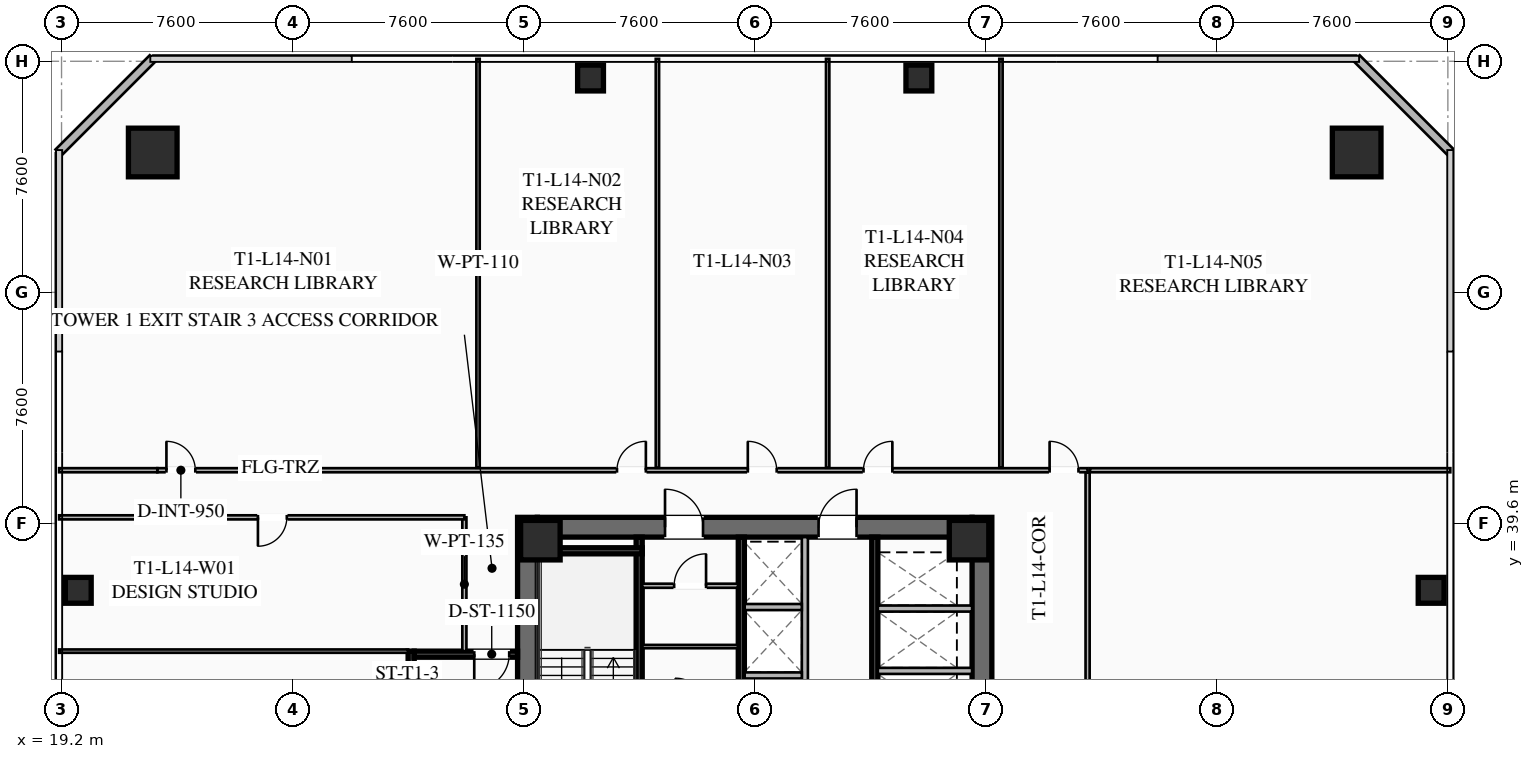
"""IFC4 building model, lengths in metres.
Left out: names, types, materials, properties, quantities, classifications, styles, units other than length and angle.
Written with IfcOpenShell. Run it as: python <this file> out.ifc"""

import sys

from ifc_helpers import new_model, si_unit, direction, frame, frame_2d, origin, origin_2d, place, context, subcontext, project, spatial, rectangle, hollow_rectangle, extrude, element, fill, save


model = new_model("IFC4")
c1 = context("Model", 3, precision=1e-05, world=origin(), true_north=direction((0.0, 1.0)))
c2 = subcontext(c1, "Body", "Model", "MODEL_VIEW")
j1 = project(units=[si_unit("LENGTHUNIT", "METRE"), si_unit("PLANEANGLEUNIT", "RADIAN")], contexts=[c1])
p1 = place(None, origin())
s1 = spatial("IfcSite", under=j1, at=p1, CompositionType="ELEMENT")
p2 = place(p1, origin())
s2 = spatial("IfcBuilding", under=s1, at=p2, CompositionType="ELEMENT")
p3 = place(p2, frame((0.0, 0.0, 56.55)))
s3 = spatial("IfcBuildingStorey", under=s2, at=p3, CompositionType="ELEMENT", Elevation=56.55)
for number, where, z_axis, x_axis in (
    (1, (34.525, 24.2, 0.0), (0.0, 0.0, 1.0), (0.0, 1.0, 0.0)),
    (2, (49.475, 39.8, 0.0), (0.0, 0.0, 1.0), (0.0, -1.0, 0.0)),
):
    element("IfcWall", number, at=place(p3, frame(where, z_axis=z_axis, x_axis=x_axis)), inside=s3, PredefinedType="SHEAR", context=c2, shape_type="SweptSolid", body=[
        extrude(rectangle(XDim=15.6, YDim=0.65, at=frame_2d((7.8, 0.0))), origin(), (0.0, 0.0, 1.0), 3.55),
    ])
p4 = place(p3, frame((34.85, 39.475, 0.0), z_axis=(0.0, 0.0, 1.0), x_axis=(1.0, 0.0, 0.0)))
e3 = element("IfcWall", 3, at=p4, inside=s3, PredefinedType="SHEAR", context=c2, shape_type="SweptSolid", body=[
    extrude(rectangle(XDim=14.3, YDim=0.65, at=frame_2d((7.15, 0.0))), origin(), (0.0, 0.0, 1.0), 3.55),
])
p5 = place(p4, frame((4.2, 0.0, 0.0)))
e4 = element("IfcOpeningElement", 4, at=p5, cuts=e3, PredefinedType="OPENING", context=c2, shape_type="SweptSolid", body=[
    extrude(rectangle(XDim=1.25, YDim=2.25, at=frame_2d((0.625, 1.125))), frame((0.0, 0.335, 0.0), z_axis=(0.0, -1.0, 0.0), x_axis=(1.0, 0.0, 0.0)), (0.0, 0.0, 1.0), 0.67),
])
p6 = place(p4, frame((9.25, 0.0, 0.0)))
e5 = element("IfcOpeningElement", 5, at=p6, cuts=e3, PredefinedType="OPENING", context=c2, shape_type="SweptSolid", body=[
    extrude(rectangle(XDim=1.25, YDim=2.25, at=frame_2d((0.625, 1.125))), frame((0.0, 0.335, 0.0), z_axis=(0.0, -1.0, 0.0), x_axis=(1.0, 0.0, 0.0)), (0.0, 0.0, 1.0), 0.67),
])
for number, where, z_axis, x_axis in (
    (6, (49.05, 39.05, 0.0), (0.0, 0.0, 1.0), (1.0, 0.0, 0.0)),
    (7, (34.95, 39.05, 0.0), (0.0, 0.0, 1.0), (1.0, 0.0, 0.0)),
):
    element("IfcColumn", number, at=place(p3, frame(where, z_axis=z_axis, x_axis=x_axis)), inside=s3, PredefinedType="COLUMN", context=c2, shape_type="SweptSolid", body=[
        extrude(hollow_rectangle(XDim=1.3, YDim=1.3, WallThickness=0.05, at=origin_2d()), origin(), (0.0, 0.0, 1.0), 3.35),
    ])
for number, where, z_axis, x_axis in (
    (8, (61.8, 51.8, 0.0), (0.0, 0.0, 1.0), (1.0, 0.0, 0.0)),
    (9, (22.2, 51.8, 0.0), (0.0, 0.0, 1.0), (1.0, 0.0, 0.0)),
):
    element("IfcColumn", number, at=place(p3, frame(where, z_axis=z_axis, x_axis=x_axis)), inside=s3, PredefinedType="COLUMN", context=c2, shape_type="SweptSolid", body=[
        extrude(hollow_rectangle(XDim=1.6, YDim=1.6, WallThickness=0.06, at=origin_2d()), origin(), (0.0, 0.0, 1.0), 3.35),
    ])
for number, where, z_axis, x_axis in (
    (10, (64.25, 37.4, 0.0), (0.0, 0.0, 1.0), (1.0, 0.0, 0.0)),
    (11, (47.4, 54.25, 0.0), (0.0, 0.0, 1.0), (1.0, 0.0, 0.0)),
    (12, (36.6, 54.25, 0.0), (0.0, 0.0, 1.0), (1.0, 0.0, 0.0)),
    (13, (19.75, 37.4, 0.0), (0.0, 0.0, 1.0), (1.0, 0.0, 0.0)),
):
    element("IfcColumn", number, at=place(p3, frame(where, z_axis=z_axis, x_axis=x_axis)), inside=s3, PredefinedType="COLUMN", context=c2, shape_type="SweptSolid", body=[
        extrude(hollow_rectangle(XDim=0.85, YDim=0.85, WallThickness=0.035, at=origin_2d()), origin(), (0.0, 0.0, 1.0), 3.35),
    ])
for number, where, z_axis, x_axis in (
    (14, (19.1, 51.8, 0.0), (0.0, 0.0, 1.0), (0.707, 0.707, 0.0)),
    (15, (61.8, 54.9, 0.0), (0.0, 0.0, 1.0), (0.707, -0.707, 0.0)),
):
    element("IfcWall", number, at=place(p3, frame(where, z_axis=z_axis, x_axis=x_axis)), inside=s3, PredefinedType="SOLIDWALL", context=c2, shape_type="SweptSolid", body=[
        extrude(rectangle(XDim=4.384, YDim=0.28, at=frame_2d((2.192, 0.0))), origin(), (0.0, 0.0, 1.0), 3.35),
    ])
p7 = place(p3, frame((38.2, 31.2, 0.0), z_axis=(0.0, 0.0, 1.0), x_axis=(0.0, 1.0, 0.0)))
e16 = element("IfcWall", 16, at=p7, inside=s3, PredefinedType="SHEAR", context=c2, shape_type="SweptSolid", body=[
    extrude(rectangle(XDim=7.95, YDim=0.2, at=frame_2d((3.975, 0.0))), origin(), (0.0, 0.0, 1.0), 3.35),
])
p8 = place(p7, frame((0.45, 0.0, 0.0)))
e17 = element("IfcOpeningElement", 17, at=p8, cuts=e16, PredefinedType="OPENING", context=c2, shape_type="SweptSolid", body=[
    extrude(rectangle(XDim=1.15, YDim=2.2, at=frame_2d((0.575, 1.1))), frame((0.0, 0.11, 0.0), z_axis=(0.0, -1.0, 0.0), x_axis=(1.0, 0.0, 0.0)), (0.0, 0.0, 1.0), 0.22),
])
p9 = place(p3, frame((34.85, 38.7, 0.0), z_axis=(0.0, 0.0, 1.0), x_axis=(1.0, 0.0, 0.0)))
e18 = element("IfcWall", 18, at=p9, inside=s3, PredefinedType="SHEAR", context=c2, shape_type="SweptSolid", body=[
    extrude(rectangle(XDim=3.45, YDim=0.2, at=frame_2d((1.725, 0.0))), origin(), (0.0, 0.0, 1.0), 3.35),
])
p10 = place(p3, frame((41.56, 24.85, 0.0), z_axis=(0.0, 0.0, 1.0), x_axis=(0.0, 1.0, 0.0)))
e19 = element("IfcWall", 19, at=p10, inside=s3, PredefinedType="SHEAR", context=c2, shape_type="SweptSolid", body=[
    extrude(rectangle(XDim=14.3, YDim=0.2, at=frame_2d((7.15, 0.0))), origin(), (0.0, 0.0, 1.0), 3.35),
])
p11 = place(p3, frame((45.95, 39.15, 0.0), z_axis=(0.0, 0.0, 1.0), x_axis=(0.0, -1.0, 0.0)))
e20 = element("IfcWall", 20, at=p11, inside=s3, PredefinedType="SHEAR", context=c2, shape_type="SweptSolid", body=[
    extrude(rectangle(XDim=6.35, YDim=0.2, at=frame_2d((3.175, 0.0))), origin(), (0.0, 0.0, 1.0), 3.35),
])
for number, where, z_axis, x_axis in (
    (21, (46.05, 34.75, 0.0), (0.0, 0.0, 1.0), (1.0, 0.0, 0.0)),
    (22, (46.05, 36.8, 0.0), (0.0, 0.0, 1.0), (1.0, 0.0, 0.0)),
):
    element("IfcWall", number, at=place(p3, frame(where, z_axis=z_axis, x_axis=x_axis)), inside=s3, PredefinedType="SOLIDWALL", context=c2, shape_type="SweptSolid", body=[
        extrude(rectangle(XDim=3.1, YDim=0.2, at=frame_2d((1.55, 0.0))), origin(), (0.0, 0.0, 1.0), 3.35),
    ])
p12 = place(p3, frame((38.3, 37.55, 0.0), z_axis=(0.0, 0.0, 1.0), x_axis=(1.0, 0.0, 0.0)))
e23 = element("IfcWall", 23, at=p12, inside=s3, PredefinedType="PARTITIONING", context=c2, shape_type="SweptSolid", body=[
    extrude(rectangle(XDim=3.15, YDim=0.135, at=frame_2d((1.575, 0.0))), origin(), (0.0, 0.0, 1.0), 2.703),
])
p13 = place(p12, frame((1.05, 0.0, 0.0)))
e24 = element("IfcOpeningElement", 24, at=p13, cuts=e23, PredefinedType="OPENING", context=c2, shape_type="SweptSolid", body=[
    extrude(rectangle(XDim=1.05, YDim=2.2, at=frame_2d((0.525, 1.1))), frame((0.0, 0.077, 0.0), z_axis=(0.0, -1.0, 0.0), x_axis=(1.0, 0.0, 0.0)), (0.0, 0.0, 1.0), 0.155),
])
p14 = place(p3, frame((38.3, 35.55, 0.0), z_axis=(0.0, 0.0, 1.0), x_axis=(1.0, 0.0, 0.0)))
e25 = element("IfcWall", 25, at=p14, inside=s3, PredefinedType="PARTITIONING", context=c2, shape_type="SweptSolid", body=[
    extrude(rectangle(XDim=3.15, YDim=0.11, at=frame_2d((1.575, 0.0))), origin(), (0.0, 0.0, 1.0), 2.703),
])
p15 = place(p3, frame((43.65, 32.35, 0.0), z_axis=(0.0, 0.0, 1.0), x_axis=(0.0, 1.0, 0.0)))
e26 = element("IfcWall", 26, at=p15, inside=s3, PredefinedType="SOLIDWALL", context=c2, shape_type="SweptSolid", body=[
    extrude(rectangle(XDim=6.8, YDim=0.2, at=frame_2d((3.4, 0.0))), origin(), (0.0, 0.0, 1.0), 3.35),
])
for number, where, z_axis, x_axis in (
    (27, (41.67, 34.6, 0.0), (0.0, 0.0, 1.0), (1.0, 0.0, 0.0)),
    (28, (41.67, 36.85, 0.0), (0.0, 0.0, 1.0), (1.0, 0.0, 0.0)),
):
    element("IfcWall", number, at=place(p3, frame(where, z_axis=z_axis, x_axis=x_axis)), inside=s3, PredefinedType="SOLIDWALL", context=c2, shape_type="SweptSolid", body=[
        extrude(rectangle(XDim=1.88, YDim=0.2, at=frame_2d((0.94, 0.0))), origin(), (0.0, 0.0, 1.0), 3.35),
    ])
p16 = place(p3, frame((30.7, 28.6, 0.0), z_axis=(0.0, 0.0, 1.0), x_axis=(0.0, 1.0, 0.0)))
e29 = element("IfcWall", 29, at=p16, inside=s3, PredefinedType="SHEAR", context=c2, shape_type="SweptSolid", body=[
    extrude(rectangle(XDim=6.8, YDim=0.2, at=frame_2d((3.4, 0.0))), origin(), (0.0, 0.0, 1.0), 3.35),
])
p17 = place(p3, frame((34.2, 35.3, 0.0), z_axis=(0.0, 0.0, 1.0), x_axis=(-1.0, 0.0, 0.0)))
e30 = element("IfcWall", 30, at=p17, inside=s3, PredefinedType="SHEAR", context=c2, shape_type="SweptSolid", body=[
    extrude(rectangle(XDim=3.4, YDim=0.2, at=frame_2d((1.7, 0.0))), origin(), (0.0, 0.0, 1.0), 3.35),
])
p18 = place(p17, frame((0.275, 0.0, 0.0)))
e31 = element("IfcOpeningElement", 31, at=p18, cuts=e30, PredefinedType="OPENING", context=c2, shape_type="SweptSolid", body=[
    extrude(rectangle(XDim=1.15, YDim=2.2, at=frame_2d((0.575, 1.1))), frame((0.0, 0.11, 0.0), z_axis=(0.0, -1.0, 0.0), x_axis=(1.0, 0.0, 0.0)), (0.0, 0.0, 1.0), 0.22),
])
p19 = place(p3, frame((32.45, 35.4, 0.0), z_axis=(0.0, 0.0, 1.0), x_axis=(0.0, 1.0, 0.0)))
e32 = element("IfcWall", 32, at=p19, inside=s3, PredefinedType="PARTITIONING", context=c2, shape_type="SweptSolid", body=[
    extrude(rectangle(XDim=4.4, YDim=0.135, at=frame_2d((2.2, 0.0))), origin(), (0.0, 0.0, 1.0), 2.703),
])
p20 = place(p3, frame((22.35, 41.35, 0.0), z_axis=(0.0, 0.0, 1.0), x_axis=(1.0, 0.0, 0.0)))
e33 = element("IfcWall", 33, at=p20, inside=s3, PredefinedType="PARTITIONING", context=c2, shape_type="SweptSolid", body=[
    extrude(rectangle(XDim=30.6, YDim=0.135, at=frame_2d((15.3, 0.0))), origin(), (0.0, 0.0, 1.0), 2.703),
])
p21 = place(p20, frame((0.3, 0.0, 0.0)))
e34 = element("IfcOpeningElement", 34, at=p21, cuts=e33, PredefinedType="OPENING", context=c2, shape_type="SweptSolid", body=[
    extrude(rectangle(XDim=0.95, YDim=2.05, at=frame_2d((0.475, 1.025))), frame((0.0, 0.077, 0.0), z_axis=(0.0, -1.0, 0.0), x_axis=(1.0, 0.0, 0.0)), (0.0, 0.0, 1.0), 0.155),
])
p22 = place(p20, frame((15.12, 0.0, 0.0)))
e35 = element("IfcOpeningElement", 35, at=p22, cuts=e33, PredefinedType="OPENING", context=c2, shape_type="SweptSolid", body=[
    extrude(rectangle(XDim=0.95, YDim=2.05, at=frame_2d((0.475, 1.025))), frame((0.0, 0.077, 0.0), z_axis=(0.0, -1.0, 0.0), x_axis=(1.0, 0.0, 0.0)), (0.0, 0.0, 1.0), 0.155),
])
p23 = place(p20, frame((19.423, 0.0, 0.0)))
e36 = element("IfcOpeningElement", 36, at=p23, cuts=e33, PredefinedType="OPENING", context=c2, shape_type="SweptSolid", body=[
    extrude(rectangle(XDim=0.95, YDim=2.05, at=frame_2d((0.475, 1.025))), frame((0.0, 0.077, 0.0), z_axis=(0.0, -1.0, 0.0), x_axis=(1.0, 0.0, 0.0)), (0.0, 0.0, 1.0), 0.155),
])
p24 = place(p20, frame((23.228, 0.0, 0.0)))
e37 = element("IfcOpeningElement", 37, at=p24, cuts=e33, PredefinedType="OPENING", context=c2, shape_type="SweptSolid", body=[
    extrude(rectangle(XDim=0.95, YDim=2.05, at=frame_2d((0.475, 1.025))), frame((0.0, 0.077, 0.0), z_axis=(0.0, -1.0, 0.0), x_axis=(1.0, 0.0, 0.0)), (0.0, 0.0, 1.0), 0.155),
])
p25 = place(p20, frame((29.35, 0.0, 0.0)))
e38 = element("IfcOpeningElement", 38, at=p25, cuts=e33, PredefinedType="OPENING", context=c2, shape_type="SweptSolid", body=[
    extrude(rectangle(XDim=0.95, YDim=2.05, at=frame_2d((0.475, 1.025))), frame((0.0, 0.077, 0.0), z_axis=(0.0, -1.0, 0.0), x_axis=(1.0, 0.0, 0.0)), (0.0, 0.0, 1.0), 0.155),
])
p26 = place(p3, frame((19.12, 41.35, 0.0), z_axis=(0.0, 0.0, 1.0), x_axis=(1.0, 0.0, 0.0)))
e39 = element("IfcWall", 39, at=p26, inside=s3, PredefinedType="PARTITIONING", context=c2, shape_type="SweptSolid", body=[
    extrude(rectangle(XDim=3.23, YDim=0.135, at=frame_2d((1.615, 0.0))), origin(), (0.0, 0.0, 1.0), 2.703),
])
for number, where, z_axis, x_axis in (
    (40, (32.9, 41.43, 0.0), (0.0, 0.0, 1.0), (0.0, 1.0, 0.0)),
    (41, (38.8, 41.43, 0.0), (0.0, 0.0, 1.0), (0.0, 1.0, 0.0)),
    (42, (44.4, 41.43, 0.0), (0.0, 0.0, 1.0), (0.0, 1.0, 0.0)),
    (43, (50.1, 41.43, 0.0), (0.0, 0.0, 1.0), (0.0, 1.0, 0.0)),
):
    element("IfcWall", number, at=place(p3, frame(where, z_axis=z_axis, x_axis=x_axis)), inside=s3, PredefinedType="PARTITIONING", context=c2, shape_type="SweptSolid", body=[
        extrude(rectangle(XDim=13.45, YDim=0.11, at=frame_2d((6.725, 0.0))), origin(), (0.0, 0.0, 1.0), 2.703),
    ])
p27 = place(p3, frame((52.95, 41.27, 0.0), z_axis=(0.0, 0.0, 1.0), x_axis=(0.0, -1.0, 0.0)))
e44 = element("IfcWall", 44, at=p27, inside=s3, PredefinedType="PARTITIONING", context=c2, shape_type="SweptSolid", body=[
    extrude(rectangle(XDim=18.91, YDim=0.135, at=frame_2d((9.455, 0.0))), origin(), (0.0, 0.0, 1.0), 2.703),
])
p28 = place(p27, frame((8.603, 0.0, 0.0)))
e45 = element("IfcOpeningElement", 45, at=p28, cuts=e44, PredefinedType="OPENING", context=c2, shape_type="SweptSolid", body=[
    extrude(rectangle(XDim=0.95, YDim=2.05, at=frame_2d((0.475, 1.025))), frame((0.0, 0.077, 0.0), z_axis=(0.0, -1.0, 0.0), x_axis=(1.0, 0.0, 0.0)), (0.0, 0.0, 1.0), 0.155),
])
p29 = place(p3, frame((64.88, 41.35, 0.0), z_axis=(0.0, 0.0, 1.0), x_axis=(-1.0, 0.0, 0.0)))
e46 = element("IfcWall", 46, at=p29, inside=s3, PredefinedType="PARTITIONING", context=c2, shape_type="SweptSolid", body=[
    extrude(rectangle(XDim=11.85, YDim=0.135, at=frame_2d((5.925, 0.0))), origin(), (0.0, 0.0, 1.0), 2.703),
])
p30 = place(p3, frame((32.45, 39.8, 0.0), z_axis=(0.0, 0.0, 1.0), x_axis=(-1.0, 0.0, 0.0)))
e47 = element("IfcWall", 47, at=p30, inside=s3, PredefinedType="PARTITIONING", context=c2, shape_type="SweptSolid", body=[
    extrude(rectangle(XDim=13.33, YDim=0.135, at=frame_2d((6.665, 0.0))), origin(), (0.0, 0.0, 1.0), 2.703),
])
p31 = place(p30, frame((5.84, 0.0, 0.0)))
e48 = element("IfcOpeningElement", 48, at=p31, cuts=e47, PredefinedType="OPENING", context=c2, shape_type="SweptSolid", body=[
    extrude(rectangle(XDim=0.95, YDim=2.05, at=frame_2d((0.475, 1.025))), frame((0.0, 0.077, 0.0), z_axis=(0.0, -1.0, 0.0), x_axis=(1.0, 0.0, 0.0)), (0.0, 0.0, 1.0), 0.155),
])
p32 = place(p3, frame((30.6, 35.4, 0.0), z_axis=(0.0, 0.0, 1.0), x_axis=(-1.0, 0.0, 0.0)))
e49 = element("IfcWall", 49, at=p32, inside=s3, PredefinedType="PARTITIONING", context=c2, shape_type="SweptSolid", body=[
    extrude(rectangle(XDim=11.48, YDim=0.11, at=frame_2d((5.74, 0.0))), origin(), (0.0, 0.0, 1.0), 2.703),
])
p33 = place(p5, origin())
e50 = element("IfcDoor", 50, at=p33, inside=s3, OperationType="SINGLE_SWING_LEFT", PredefinedType="DOOR", context=c2, shape_type="SweptSolid", body=[
    extrude(rectangle(XDim=1.25, YDim=2.25, at=frame_2d((0.625, 1.125))), frame((0.0, 0.025, 0.0), z_axis=(0.0, -1.0, 0.0), x_axis=(1.0, 0.0, 0.0)), (0.0, 0.0, 1.0), 0.05),
])
fill(e4, e50)
p34 = place(p6, origin())
e51 = element("IfcDoor", 51, at=p34, inside=s3, OperationType="SINGLE_SWING_RIGHT", PredefinedType="DOOR", context=c2, shape_type="SweptSolid", body=[
    extrude(rectangle(XDim=1.25, YDim=2.25, at=frame_2d((0.625, 1.125))), frame((0.0, 0.025, 0.0), z_axis=(0.0, -1.0, 0.0), x_axis=(1.0, 0.0, 0.0)), (0.0, 0.0, 1.0), 0.05),
])
fill(e5, e51)
p35 = place(p13, origin())
e52 = element("IfcDoor", 52, at=p35, inside=s3, OperationType="SINGLE_SWING_RIGHT", PredefinedType="DOOR", context=c2, shape_type="SweptSolid", body=[
    extrude(rectangle(XDim=1.05, YDim=2.2, at=frame_2d((0.525, 1.1))), frame((0.0, 0.025, 0.0), z_axis=(0.0, -1.0, 0.0), x_axis=(1.0, 0.0, 0.0)), (0.0, 0.0, 1.0), 0.05),
])
fill(e24, e52)
p36 = place(p18, origin())
e53 = element("IfcDoor", 53, at=p36, inside=s3, OperationType="SINGLE_SWING_RIGHT", PredefinedType="DOOR", context=c2, shape_type="SweptSolid", body=[
    extrude(rectangle(XDim=1.15, YDim=2.2, at=frame_2d((0.575, 1.1))), frame((0.0, 0.025, 0.0), z_axis=(0.0, -1.0, 0.0), x_axis=(1.0, 0.0, 0.0)), (0.0, 0.0, 1.0), 0.05),
])
fill(e31, e53)
p37 = place(p21, origin())
e54 = element("IfcDoor", 54, at=p37, inside=s3, OperationType="SINGLE_SWING_LEFT", PredefinedType="DOOR", context=c2, shape_type="SweptSolid", body=[
    extrude(rectangle(XDim=0.95, YDim=2.05, at=frame_2d((0.475, 1.025))), frame((0.0, 0.025, 0.0), z_axis=(0.0, -1.0, 0.0), x_axis=(1.0, 0.0, 0.0)), (0.0, 0.0, 1.0), 0.05),
])
fill(e34, e54)
p38 = place(p22, origin())
e55 = element("IfcDoor", 55, at=p38, inside=s3, OperationType="SINGLE_SWING_RIGHT", PredefinedType="DOOR", context=c2, shape_type="SweptSolid", body=[
    extrude(rectangle(XDim=0.95, YDim=2.05, at=frame_2d((0.475, 1.025))), frame((0.0, 0.025, 0.0), z_axis=(0.0, -1.0, 0.0), x_axis=(1.0, 0.0, 0.0)), (0.0, 0.0, 1.0), 0.05),
])
fill(e35, e55)
p39 = place(p23, origin())
e56 = element("IfcDoor", 56, at=p39, inside=s3, OperationType="SINGLE_SWING_LEFT", PredefinedType="DOOR", context=c2, shape_type="SweptSolid", body=[
    extrude(rectangle(XDim=0.95, YDim=2.05, at=frame_2d((0.475, 1.025))), frame((0.0, 0.025, 0.0), z_axis=(0.0, -1.0, 0.0), x_axis=(1.0, 0.0, 0.0)), (0.0, 0.0, 1.0), 0.05),
])
fill(e36, e56)
p40 = place(p24, origin())
e57 = element("IfcDoor", 57, at=p40, inside=s3, OperationType="SINGLE_SWING_RIGHT", PredefinedType="DOOR", context=c2, shape_type="SweptSolid", body=[
    extrude(rectangle(XDim=0.95, YDim=2.05, at=frame_2d((0.475, 1.025))), frame((0.0, 0.025, 0.0), z_axis=(0.0, -1.0, 0.0), x_axis=(1.0, 0.0, 0.0)), (0.0, 0.0, 1.0), 0.05),
])
fill(e37, e57)
p41 = place(p25, origin())
e58 = element("IfcDoor", 58, at=p41, inside=s3, OperationType="SINGLE_SWING_LEFT", PredefinedType="DOOR", context=c2, shape_type="SweptSolid", body=[
    extrude(rectangle(XDim=0.95, YDim=2.05, at=frame_2d((0.475, 1.025))), frame((0.0, 0.025, 0.0), z_axis=(0.0, -1.0, 0.0), x_axis=(1.0, 0.0, 0.0)), (0.0, 0.0, 1.0), 0.05),
])
fill(e38, e58)
p42 = place(p31, origin())
e59 = element("IfcDoor", 59, at=p42, inside=s3, OperationType="SINGLE_SWING_RIGHT", PredefinedType="DOOR", context=c2, shape_type="SweptSolid", body=[
    extrude(rectangle(XDim=0.95, YDim=2.05, at=frame_2d((0.475, 1.025))), frame((0.0, 0.025, 0.0), z_axis=(0.0, -1.0, 0.0), x_axis=(1.0, 0.0, 0.0)), (0.0, 0.0, 1.0), 0.05),
])
fill(e48, e59)
save(model, sys.argv[1])
